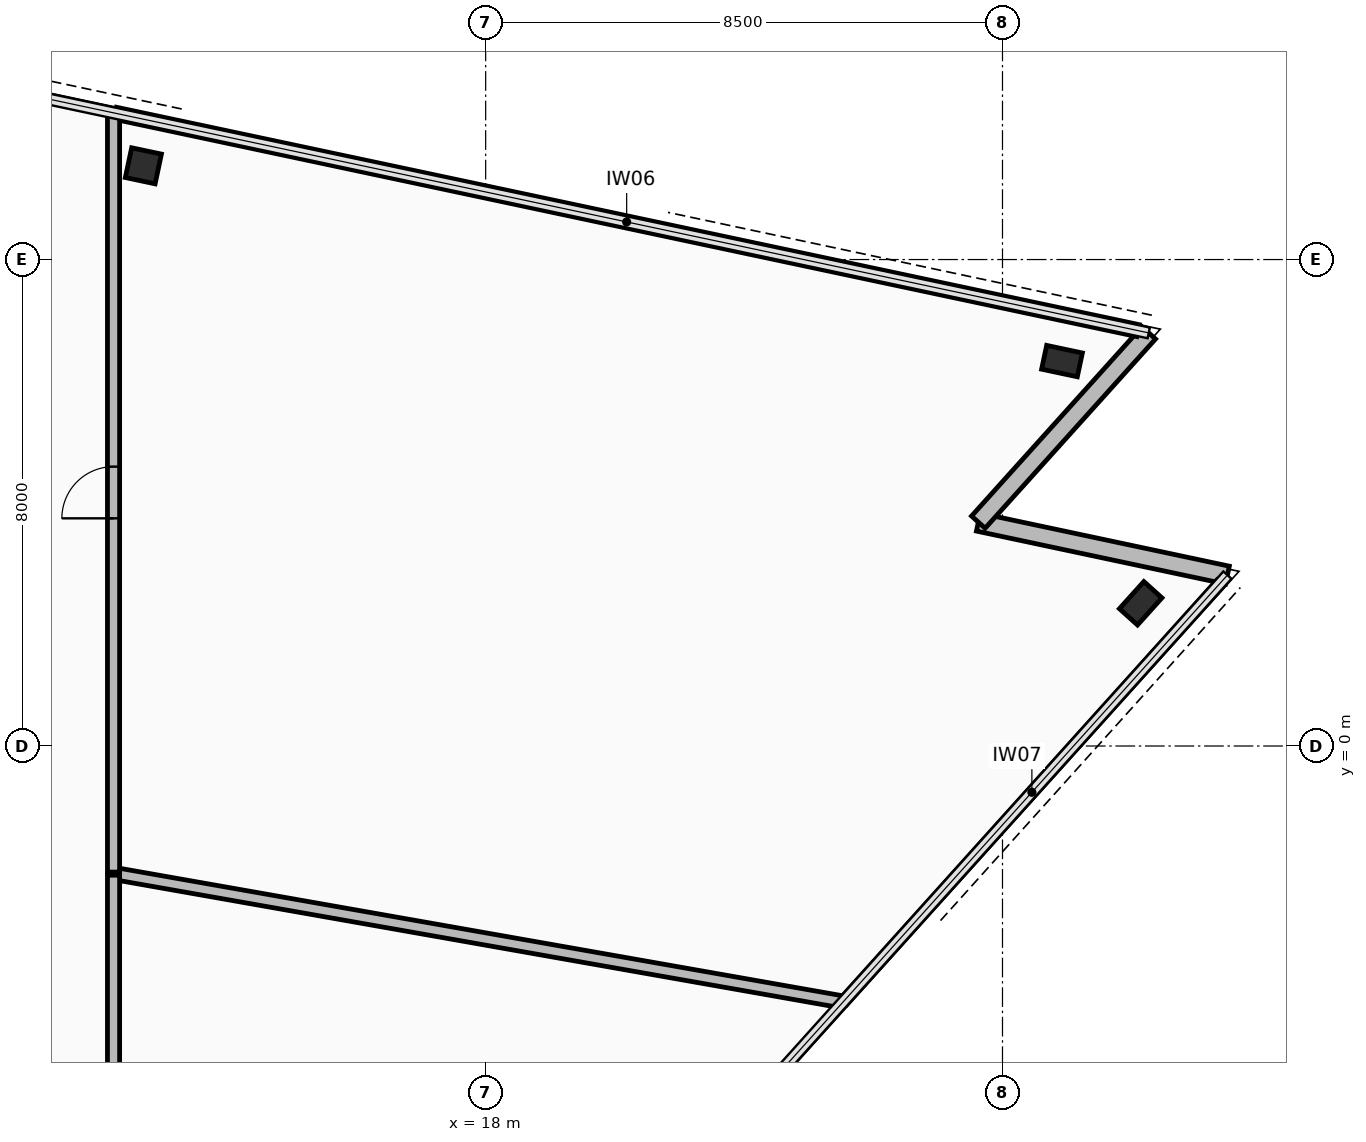
"""IFC4 building model, lengths in metres.
Left out: names, types, materials, properties, quantities, classifications, styles, units other than length and angle.
Written with IfcOpenShell. Run it as: python <this file> out.ifc"""

import sys

from ifc_helpers import new_model, si_unit, direction, frame, frame_2d, origin, origin_2d, place, context, subcontext, project, spatial, rectangle, hollow_rectangle, extrude, element, fill, save


model = new_model("IFC4")
c1 = context("Model", 3, precision=1e-05, world=origin(), true_north=direction((0.0, 1.0)))
c2 = subcontext(c1, "Body", "Model", "MODEL_VIEW")
j1 = project(units=[si_unit("LENGTHUNIT", "METRE"), si_unit("PLANEANGLEUNIT", "RADIAN")], contexts=[c1])
p1 = place(None, origin())
s1 = spatial("IfcSite", under=j1, at=p1, CompositionType="ELEMENT")
p2 = place(p1, origin())
s2 = spatial("IfcBuilding", under=s1, at=p2, CompositionType="ELEMENT")
p3 = place(p2, frame((0.0, 0.0, 211.25)))
s3 = spatial("IfcBuildingStorey", under=s2, at=p3, CompositionType="ELEMENT", Elevation=211.25)
for number, where, z_axis, x_axis in (
    (1, (28.773, 2.347, 0.0), (0.0, 0.0, 1.0), (0.669, 0.743, 0.0)),
    (2, (27.479, 6.33, 0.0), (0.0, 0.0, 1.0), (-0.978, 0.208, 0.0)),
):
    element("IfcColumn", number, at=place(p3, frame(where, z_axis=z_axis, x_axis=x_axis)), inside=s3, PredefinedType="COLUMN", context=c2, shape_type="SweptSolid", body=[
        extrude(hollow_rectangle(XDim=0.4, YDim=0.6, WallThickness=0.03, at=origin_2d()), origin(), (0.0, 0.0, 1.0), 3.6),
    ])
p4 = place(p3, frame((12.371, 9.542, 0.0), z_axis=(0.0, 0.0, 1.0), x_axis=(-0.978147600734, 0.207911690818, 0.0)))
e3 = element("IfcColumn", 3, at=p4, inside=s3, PredefinedType="COLUMN", context=c2, shape_type="SweptSolid", body=[
    extrude(hollow_rectangle(XDim=0.5, YDim=0.5, WallThickness=0.032, at=origin_2d()), origin(), (0.0, 0.0, 1.0), 3.6),
])
for number, where, z_axis, x_axis in (
    (4, (30.199, 2.811, 0.0), (0.0, 0.0, 1.0), (-0.978, 0.208, 0.0)),
    (5, (26.103, 3.681, 0.0), (0.0, 0.0, 1.0), (0.669, 0.743, 0.0)),
):
    element("IfcWall", number, at=place(p3, frame(where, z_axis=z_axis, x_axis=x_axis)), inside=s3, PredefinedType="STANDARD", context=c2, shape_type="SweptSolid", body=[
        extrude(rectangle(XDim=4.188, YDim=0.3, at=frame_2d((2.094, 0.0))), origin(), (0.0, 0.0, 1.0), 2.715),
    ])
p5 = place(p3, frame((11.908, 10.406, 0.0), z_axis=(0.0, 0.0, 1.0), x_axis=(0.978147593012, -0.207911727146, 0.0)))
e6 = element("IfcWall", 6, at=p5, inside=s3, PredefinedType="PARTITIONING", context=c2, shape_type="SweptSolid", body=[
    extrude(rectangle(XDim=17.198, YDim=0.2, at=frame_2d((8.599, 0.0))), origin(), (0.0, 0.0, 1.0), 3.42),
])
p6 = place(p3, frame((30.08, 2.677, 0.0), z_axis=(0.0, 0.0, 1.0), x_axis=(-0.669139610983, -0.743136717579, 0.0)))
e7 = element("IfcWall", 7, at=p6, inside=s3, PredefinedType="PARTITIONING", context=c2, shape_type="SweptSolid", body=[
    extrude(rectangle(XDim=9.255, YDim=0.15, at=frame_2d((4.627, 0.0))), origin(), (0.0, 0.0, 1.0), 3.42),
])
p7 = place(p3, frame((23.864, -4.208, 0.0), z_axis=(0.0, 0.0, 1.0), x_axis=(-0.984805603915, 0.173660365361, 0.0)))
e8 = element("IfcWall", 8, at=p7, inside=s3, PredefinedType="PARTITIONING", context=c2, shape_type="SweptSolid", body=[
    extrude(rectangle(XDim=12.148, YDim=0.2, at=frame_2d((6.074, 0.0))), origin(), (0.0, 0.0, 1.0), 2.715),
])
p8 = place(p3, frame((11.88, -2.074, 0.0), z_axis=(0.0, 0.0, 1.0), x_axis=(0.0, 1.0, 0.0)))
e9 = element("IfcWall", 9, at=p8, inside=s3, PredefinedType="PARTITIONING", context=c2, shape_type="SweptSolid", body=[
    extrude(rectangle(XDim=12.486, YDim=0.2, at=frame_2d((6.243, 0.0))), origin(), (0.0, 0.0, 1.0), 2.715),
])
p9 = place(p8, frame((5.818, 0.0, 0.0)))
e10 = element("IfcOpeningElement", 10, at=p9, cuts=e9, PredefinedType="OPENING", context=c2, shape_type="SweptSolid", body=[
    extrude(rectangle(XDim=0.85, YDim=2.1, at=frame_2d((0.425, 1.05))), frame((0.0, 0.11, 0.0), z_axis=(0.0, -1.0, 0.0), x_axis=(1.0, 0.0, 0.0)), (0.0, 0.0, 1.0), 0.22),
])
p10 = place(p3, frame((11.88, -10.579, 0.0), z_axis=(0.0, 0.0, 1.0), x_axis=(0.0, 1.0, 0.0)))
e11 = element("IfcWall", 11, at=p10, inside=s3, PredefinedType="PARTITIONING", context=c2, shape_type="SweptSolid", body=[
    extrude(rectangle(XDim=8.455, YDim=0.2, at=frame_2d((4.228, 0.0))), origin(), (0.0, 0.0, 1.0), 2.865),
])
p11 = place(p9, origin())
e12 = element("IfcDoor", 12, at=p11, inside=s3, OperationType="SINGLE_SWING_RIGHT", PredefinedType="DOOR", context=c2, shape_type="SweptSolid", body=[
    extrude(rectangle(XDim=0.85, YDim=2.1, at=frame_2d((0.425, 1.05))), frame((0.0, 0.025, 0.0), z_axis=(0.0, -1.0, 0.0), x_axis=(1.0, 0.0, 0.0)), (0.0, 0.0, 1.0), 0.05),
])
fill(e10, e12)
save(model, sys.argv[1])
